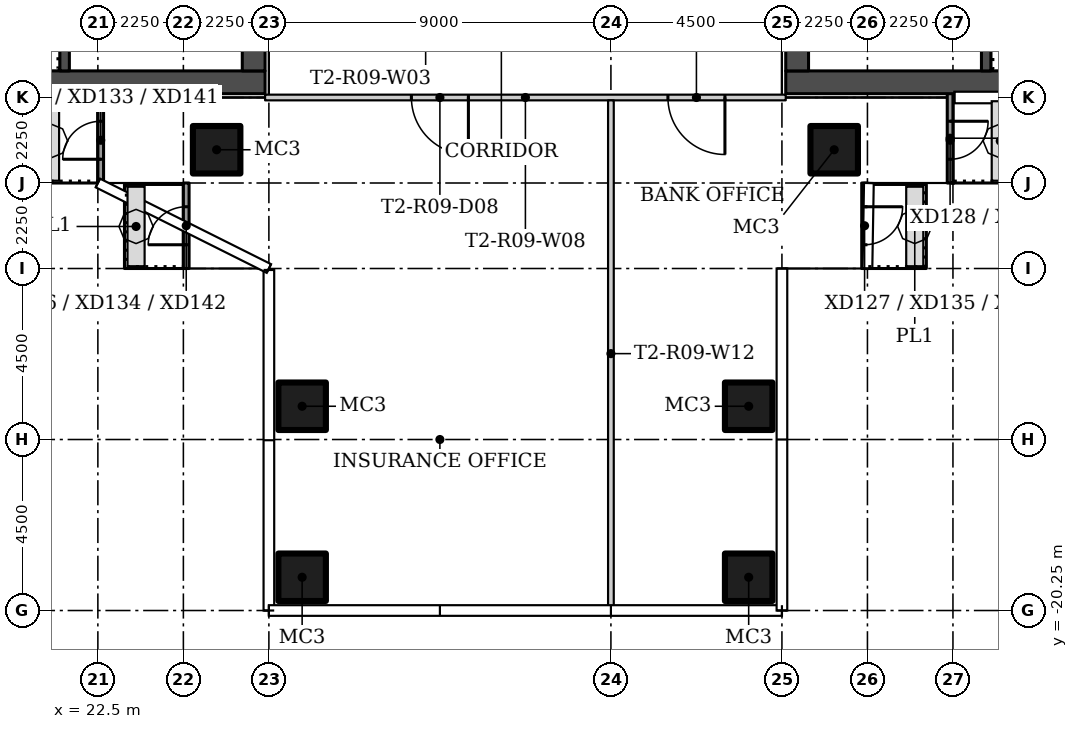
"""IFC4 building model, lengths in metres.
Left out: names, types, materials, properties, quantities, classifications, styles, units other than length and angle.
Written with IfcOpenShell. Run it as: python <this file> out.ifc"""

import sys

from ifc_helpers import new_model, si_unit, direction, frame, frame_2d, origin, origin_2d, place, context, subcontext, project, spatial, rectangle, hollow_rectangle, extrude, element, fill, save


model = new_model("IFC4")
c1 = context("Model", 3, precision=1e-05, world=origin(), true_north=direction((0.0, 1.0)))
c2 = subcontext(c1, "Body", "Model", "MODEL_VIEW")
j1 = project(units=[si_unit("LENGTHUNIT", "METRE"), si_unit("PLANEANGLEUNIT", "RADIAN")], contexts=[c1])
p1 = place(None, origin())
s1 = spatial("IfcSite", under=j1, at=p1, CompositionType="ELEMENT")
p2 = place(p1, origin())
s2 = spatial("IfcBuilding", under=s1, at=p2, CompositionType="ELEMENT")
p3 = place(p2, frame((0.0, 0.0, 89.7)))
s3 = spatial("IfcBuildingStorey", under=s2, at=p3, CompositionType="ELEMENT", Elevation=89.7)
for number, where in (
    (1, (25.625, -8.125, 0.0)),
    (2, (41.875, -8.125, 0.0)),
    (3, (39.625, -14.875, 0.0)),
    (4, (39.625, -19.375, 0.0)),
    (5, (27.875, -14.875, 0.0)),
    (6, (27.875, -19.375, 0.0)),
):
    element("IfcColumn", number, at=place(p3, frame(where)), inside=s3, PredefinedType="COLUMN", context=c2, shape_type="SweptSolid", body=[
        extrude(hollow_rectangle(XDim=1.25, YDim=1.25, WallThickness=0.05, at=origin_2d()), origin(), (0.0, 0.0, 1.0), 3.55),
    ])
p4 = place(p3, frame((40.6, -6.75, 0.0), z_axis=(0.0, 0.0, 1.0), x_axis=(-1.0, 0.0, 0.0)))
e7 = element("IfcWall", 7, at=p4, inside=s3, PredefinedType="PARTITIONING", context=c2, shape_type="SweptSolid", body=[
    extrude(rectangle(XDim=13.7, YDim=0.15, at=frame_2d((6.85, 0.0))), origin(), (0.0, 0.0, 1.0), 3.55),
])
p5 = place(p4, frame((8.35, 0.0, 0.0)))
e8 = element("IfcOpeningElement", 8, at=p5, cuts=e7, PredefinedType="OPENING", context=c2, shape_type="SweptSolid", body=[
    extrude(rectangle(XDim=1.5, YDim=2.1, at=frame_2d((0.75, 1.05))), frame((0.0, 0.085, 0.0), z_axis=(0.0, -1.0, 0.0), x_axis=(1.0, 0.0, 0.0)), (0.0, 0.0, 1.0), 0.17),
])
p6 = place(p4, frame((1.6, 0.0, 0.0)))
e9 = element("IfcOpeningElement", 9, at=p6, cuts=e7, PredefinedType="OPENING", context=c2, shape_type="SweptSolid", body=[
    extrude(rectangle(XDim=1.5, YDim=2.1, at=frame_2d((0.75, 1.05))), frame((0.0, 0.085, 0.0), z_axis=(0.0, -1.0, 0.0), x_axis=(1.0, 0.0, 0.0)), (0.0, 0.0, 1.0), 0.17),
])
p7 = place(p3, frame((36.0, -6.825, 0.0), z_axis=(0.0, 0.0, 1.0), x_axis=(0.0, -1.0, 0.0)))
e10 = element("IfcWall", 10, at=p7, inside=s3, PredefinedType="PARTITIONING", context=c2, shape_type="SweptSolid", body=[
    extrude(rectangle(XDim=13.33, YDim=0.15, at=frame_2d((6.665, 0.0))), origin(), (0.0, 0.0, 1.0), 3.55),
])
p8 = place(p3, frame((22.575, -9.0, 0.0), z_axis=(0.0, 0.0, 1.0), x_axis=(0.0, 1.0, 0.0)))
e11 = element("IfcWall", 11, at=p8, inside=s3, PredefinedType="SOLIDWALL", context=c2, shape_type="SweptSolid", body=[
    extrude(rectangle(XDim=2.357, YDim=0.15, at=frame_2d((1.178, 0.0))), origin(), (0.0, 0.0, 1.0), 3.45),
])
p9 = place(p8, frame((0.625, 0.0, 0.0)))
e12 = element("IfcOpeningElement", 12, at=p9, cuts=e11, PredefinedType="OPENING", context=c2, shape_type="SweptSolid", body=[
    extrude(rectangle(XDim=1.0, YDim=2.4, at=frame_2d((0.5, 1.2))), frame((0.0, 0.085, 0.0), z_axis=(0.0, -1.0, 0.0), x_axis=(1.0, 0.0, 0.0)), (0.0, 0.0, 1.0), 0.17),
])
p10 = place(p3, frame((24.825, -11.25, 0.0), z_axis=(0.0, 0.0, 1.0), x_axis=(0.0, 1.0, 0.0)))
e13 = element("IfcWall", 13, at=p10, inside=s3, PredefinedType="SOLIDWALL", context=c2, shape_type="SweptSolid", body=[
    extrude(rectangle(XDim=2.25, YDim=0.15, at=frame_2d((1.125, 0.0))), origin(), (0.0, 0.0, 1.0), 3.45),
])
p11 = place(p10, frame((0.625, 0.0, 0.0)))
e14 = element("IfcOpeningElement", 14, at=p11, cuts=e13, PredefinedType="OPENING", context=c2, shape_type="SweptSolid", body=[
    extrude(rectangle(XDim=1.0, YDim=2.4, at=frame_2d((0.5, 1.2))), frame((0.0, 0.085, 0.0), z_axis=(0.0, -1.0, 0.0), x_axis=(1.0, 0.0, 0.0)), (0.0, 0.0, 1.0), 0.17),
])
p12 = place(p3, frame((42.675, -9.0, 0.0), z_axis=(0.0, 0.0, 1.0), x_axis=(0.0, -1.0, 0.0)))
e15 = element("IfcWall", 15, at=p12, inside=s3, PredefinedType="SOLIDWALL", context=c2, shape_type="SweptSolid", body=[
    extrude(rectangle(XDim=2.25, YDim=0.15, at=frame_2d((1.125, 0.0))), origin(), (0.0, 0.0, 1.0), 3.45),
])
p13 = place(p12, frame((0.625, 0.0, 0.0)))
e16 = element("IfcOpeningElement", 16, at=p13, cuts=e15, PredefinedType="OPENING", context=c2, shape_type="SweptSolid", body=[
    extrude(rectangle(XDim=1.0, YDim=2.4, at=frame_2d((0.5, 1.2))), frame((0.0, 0.085, 0.0), z_axis=(0.0, -1.0, 0.0), x_axis=(1.0, 0.0, 0.0)), (0.0, 0.0, 1.0), 0.17),
])
p14 = place(p3, frame((44.925, -6.643, 0.0), z_axis=(0.0, 0.0, 1.0), x_axis=(0.0, -1.0, 0.0)))
e17 = element("IfcWall", 17, at=p14, inside=s3, PredefinedType="SOLIDWALL", context=c2, shape_type="SweptSolid", body=[
    extrude(rectangle(XDim=2.357, YDim=0.15, at=frame_2d((1.178, 0.0))), origin(), (0.0, 0.0, 1.0), 3.45),
])
p15 = place(p14, frame((0.732, 0.0, 0.0)))
e18 = element("IfcOpeningElement", 18, at=p15, cuts=e17, PredefinedType="OPENING", context=c2, shape_type="SweptSolid", body=[
    extrude(rectangle(XDim=1.0, YDim=2.4, at=frame_2d((0.5, 1.2))), frame((0.0, 0.085, 0.0), z_axis=(0.0, -1.0, 0.0), x_axis=(1.0, 0.0, 0.0)), (0.0, 0.0, 1.0), 0.17),
])
p16 = place(p3, frame((13.6, -6.35, 0.0)))
e19 = element("IfcWall", 19, at=p16, inside=s3, PredefinedType="SHEAR", context=c2, shape_type="SweptSolid", body=[
    extrude(rectangle(XDim=13.3, YDim=0.6, at=frame_2d((6.65, 0.0))), origin(), (0.0, 0.0, 1.0), 3.55),
])
p17 = place(p3, frame((26.6, 6.05, 0.0), z_axis=(0.0, 0.0, 1.0), x_axis=(0.0, -1.0, 0.0)))
e20 = element("IfcWall", 20, at=p17, inside=s3, PredefinedType="SHEAR", context=c2, shape_type="SweptSolid", body=[
    extrude(rectangle(XDim=12.1, YDim=0.6, at=frame_2d((6.05, 0.0))), origin(), (0.0, 0.0, 1.0), 3.55),
])
p18 = place(p17, frame((10.1, 0.0, 0.0)))
e21 = element("IfcOpeningElement", 21, at=p18, cuts=e20, PredefinedType="OPENING", context=c2, shape_type="SweptSolid", body=[
    extrude(rectangle(XDim=1.2, YDim=2.1, at=frame_2d((0.6, 1.05))), frame((0.0, 0.31, 0.0), z_axis=(0.0, -1.0, 0.0), x_axis=(1.0, 0.0, 0.0)), (0.0, 0.0, 1.0), 0.62),
])
p19 = place(p17, frame((3.9, 0.0, 0.0)))
e22 = element("IfcOpeningElement", 22, at=p19, cuts=e20, PredefinedType="OPENING", context=c2, shape_type="SweptSolid", body=[
    extrude(rectangle(XDim=1.8, YDim=2.4, at=frame_2d((0.9, 1.2))), frame((0.0, 0.31, 0.0), z_axis=(0.0, -1.0, 0.0), x_axis=(1.0, 0.0, 0.0)), (0.0, 0.0, 1.0), 0.62),
])
p20 = place(p3, frame((21.625, -6.05, 0.0), z_axis=(0.0, 0.0, 1.0), x_axis=(0.0, 1.0, 0.0)))
e23 = element("IfcWall", 23, at=p20, inside=s3, PredefinedType="SHEAR", context=c2, shape_type="SweptSolid", body=[
    extrude(rectangle(XDim=2.55, YDim=0.25, at=frame_2d((1.275, 0.0))), origin(), (0.0, 0.0, 1.0), 3.55),
])
p21 = place(p3, frame((53.9, -6.35, 0.0), z_axis=(0.0, 0.0, 1.0), x_axis=(-1.0, 0.0, 0.0)))
e24 = element("IfcWall", 24, at=p21, inside=s3, PredefinedType="SHEAR", context=c2, shape_type="SweptSolid", body=[
    extrude(rectangle(XDim=13.3, YDim=0.6, at=frame_2d((6.65, 0.0))), origin(), (0.0, 0.0, 1.0), 3.55),
])
p22 = place(p3, frame((40.9, -6.05, 0.0), z_axis=(0.0, 0.0, 1.0), x_axis=(0.0, 1.0, 0.0)))
e25 = element("IfcWall", 25, at=p22, inside=s3, PredefinedType="SHEAR", context=c2, shape_type="SweptSolid", body=[
    extrude(rectangle(XDim=12.1, YDim=0.6, at=frame_2d((6.05, 0.0))), origin(), (0.0, 0.0, 1.0), 3.55),
])
p23 = place(p22, frame((0.8, 0.0, 0.0)))
e26 = element("IfcOpeningElement", 26, at=p23, cuts=e25, PredefinedType="OPENING", context=c2, shape_type="SweptSolid", body=[
    extrude(rectangle(XDim=1.2, YDim=2.1, at=frame_2d((0.6, 1.05))), frame((0.0, 0.31, 0.0), z_axis=(0.0, -1.0, 0.0), x_axis=(1.0, 0.0, 0.0)), (0.0, 0.0, 1.0), 0.62),
])
p24 = place(p22, frame((6.4, 0.0, 0.0)))
e27 = element("IfcOpeningElement", 27, at=p24, cuts=e25, PredefinedType="OPENING", context=c2, shape_type="SweptSolid", body=[
    extrude(rectangle(XDim=1.8, YDim=2.4, at=frame_2d((0.9, 1.2))), frame((0.0, 0.31, 0.0), z_axis=(0.0, -1.0, 0.0), x_axis=(1.0, 0.0, 0.0)), (0.0, 0.0, 1.0), 0.62),
])
p25 = place(p3, frame((45.875, -6.05, 0.0), z_axis=(0.0, 0.0, 1.0), x_axis=(0.0, 1.0, 0.0)))
e28 = element("IfcWall", 28, at=p25, inside=s3, PredefinedType="SHEAR", context=c2, shape_type="SweptSolid", body=[
    extrude(rectangle(XDim=2.55, YDim=0.25, at=frame_2d((1.275, 0.0))), origin(), (0.0, 0.0, 1.0), 3.55),
])
p26 = place(p5, origin())
e29 = element("IfcDoor", 29, at=p26, inside=s3, OperationType="DOUBLE_DOOR_SINGLE_SWING", PredefinedType="DOOR", context=c2, shape_type="SweptSolid", body=[
    extrude(rectangle(XDim=1.5, YDim=2.1, at=frame_2d((0.75, 1.05))), frame((0.0, 0.025, 0.0), z_axis=(0.0, -1.0, 0.0), x_axis=(1.0, 0.0, 0.0)), (0.0, 0.0, 1.0), 0.05),
])
fill(e8, e29)
p27 = place(p6, origin())
e30 = element("IfcDoor", 30, at=p27, inside=s3, OperationType="DOUBLE_DOOR_SINGLE_SWING", PredefinedType="DOOR", context=c2, shape_type="SweptSolid", body=[
    extrude(rectangle(XDim=1.5, YDim=2.1, at=frame_2d((0.75, 1.05))), frame((0.0, 0.025, 0.0), z_axis=(0.0, -1.0, 0.0), x_axis=(1.0, 0.0, 0.0)), (0.0, 0.0, 1.0), 0.05),
])
fill(e9, e30)
p28 = place(p9, origin())
e31 = element("IfcDoor", 31, at=p28, inside=s3, OperationType="SINGLE_SWING_LEFT", PredefinedType="DOOR", context=c2, shape_type="SweptSolid", body=[
    extrude(rectangle(XDim=1.0, YDim=2.4, at=frame_2d((0.5, 1.2))), frame((0.0, 0.025, 0.0), z_axis=(0.0, -1.0, 0.0), x_axis=(1.0, 0.0, 0.0)), (0.0, 0.0, 1.0), 0.05),
])
fill(e12, e31)
p29 = place(p11, origin())
e32 = element("IfcDoor", 32, at=p29, inside=s3, OperationType="SINGLE_SWING_RIGHT", PredefinedType="DOOR", context=c2, shape_type="SweptSolid", body=[
    extrude(rectangle(XDim=1.0, YDim=2.4, at=frame_2d((0.5, 1.2))), frame((0.0, 0.025, 0.0), z_axis=(0.0, -1.0, 0.0), x_axis=(1.0, 0.0, 0.0)), (0.0, 0.0, 1.0), 0.05),
])
fill(e14, e32)
p30 = place(p13, origin())
e33 = element("IfcDoor", 33, at=p30, inside=s3, OperationType="SINGLE_SWING_LEFT", PredefinedType="DOOR", context=c2, shape_type="SweptSolid", body=[
    extrude(rectangle(XDim=1.0, YDim=2.4, at=frame_2d((0.5, 1.2))), frame((0.0, 0.025, 0.0), z_axis=(0.0, -1.0, 0.0), x_axis=(1.0, 0.0, 0.0)), (0.0, 0.0, 1.0), 0.05),
])
fill(e16, e33)
p31 = place(p15, origin())
e34 = element("IfcDoor", 34, at=p31, inside=s3, OperationType="SINGLE_SWING_RIGHT", PredefinedType="DOOR", context=c2, shape_type="SweptSolid", body=[
    extrude(rectangle(XDim=1.0, YDim=2.4, at=frame_2d((0.5, 1.2))), frame((0.0, 0.025, 0.0), z_axis=(0.0, -1.0, 0.0), x_axis=(1.0, 0.0, 0.0)), (0.0, 0.0, 1.0), 0.05),
])
fill(e18, e34)
save(model, sys.argv[1])
